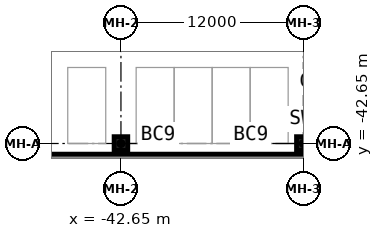
"""IFC4 building model, lengths in metres.
Left out: names, types, materials, properties, quantities, classifications, styles, units other than length and angle.
Written with IfcOpenShell. Run it as: python <this file> out.ifc"""

import sys

from ifc_helpers import new_model, si_unit, direction, frame, frame_2d, origin, origin_2d, place, context, subcontext, project, spatial, rectangle, extrude, source, transform, mapped, element, save


model = new_model("IFC4")
c1 = context("Model", 3, precision=1e-05, world=origin(), true_north=direction((0.0, 1.0)))
c2 = subcontext(c1, "Body", "Model", "MODEL_VIEW")
j1 = project(units=[si_unit("LENGTHUNIT", "METRE"), si_unit("PLANEANGLEUNIT", "RADIAN")], contexts=[c1])
p1 = place(None, origin())
s1 = spatial("IfcSite", under=j1, at=p1, CompositionType="ELEMENT")
p2 = place(p1, origin())
s2 = spatial("IfcBuilding", under=s1, at=p2, CompositionType="ELEMENT")
p3 = place(p2, frame((0.0, 0.0, -4.5)))
s3 = spatial("IfcBuildingStorey", under=s2, at=p3, CompositionType="ELEMENT", Elevation=-4.5)
m1 = source(origin(), c2, "Body", "SweptSolid", [
    extrude(rectangle(XDim=0.9, YDim=0.9, at=origin_2d()), origin(), (0.0, 0.0, 1.0), 4.5),
])
for number, where, z_axis, x_axis in (
    (1, (-42.65, -42.65, 0.0), (0.0, 0.0, 1.0), (1.0, 0.0, 0.0)),
    (2, (-30.65, -42.65, 0.0), (0.0, 0.0, 1.0), (1.0, 0.0, 0.0)),
):
    element("IfcColumn", number, at=place(p3, frame(where, z_axis=z_axis, x_axis=x_axis)), inside=s3, PredefinedType="COLUMN", context=c2, shape_type="MappedRepresentation", body=[
        mapped(m1, transform((0.0, 0.0, 0.0))),
    ])
m2 = source(origin(), c2, "Body", "SweptSolid", [
    extrude(rectangle(XDim=89.85, YDim=0.5, at=frame_2d((44.925, 0.0))), origin(), (0.0, 0.0, 1.0), 4.5),
])
p4 = place(p3, frame((-57.15, -43.6, 0.0), z_axis=(0.0, 0.0, 1.0), x_axis=(1.0, 0.0, 0.0)))
e3 = element("IfcWall", 3, at=p4, inside=s3, PredefinedType="SOLIDWALL", context=c2, shape_type="MappedRepresentation", body=[
    mapped(m2, transform((0.0, 0.0, 0.0))),
])
save(model, sys.argv[1])
